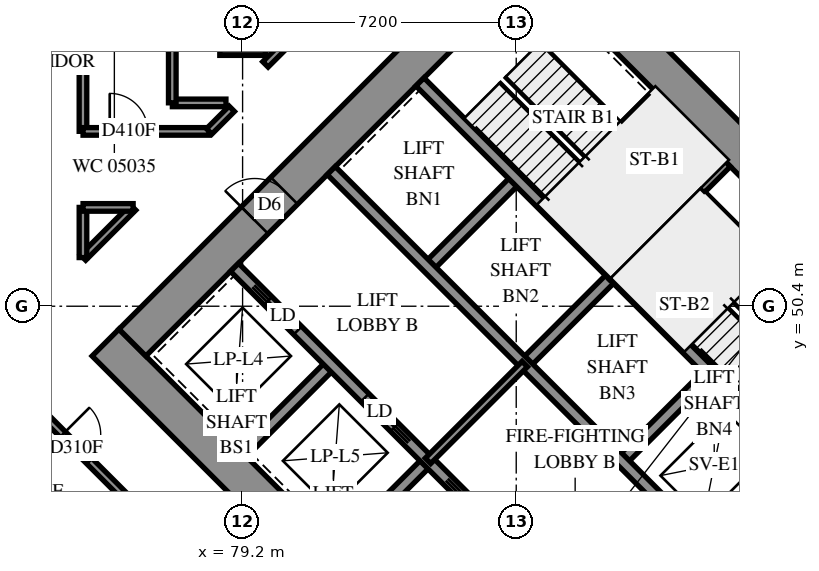
"""IFC4 building model, lengths in metres.
Left out: names, types, materials, properties, quantities, classifications, styles, units other than length and angle.
Written with IfcOpenShell. Run it as: python <this file> out.ifc"""

import sys

from ifc_helpers import new_model, si_unit, direction, frame, frame_2d, origin, origin_2d, place, context, subcontext, project, spatial, polyline, rectangle, outline, extrude, element, fill, save


model = new_model("IFC4")
c1 = context("Model", 3, precision=1e-05, world=origin(), true_north=direction((0.0, 1.0)))
c2 = subcontext(c1, "Body", "Model", "MODEL_VIEW")
j1 = project(units=[si_unit("LENGTHUNIT", "METRE"), si_unit("PLANEANGLEUNIT", "RADIAN")], contexts=[c1])
p1 = place(None, origin())
s1 = spatial("IfcSite", under=j1, at=p1, CompositionType="ELEMENT")
p2 = place(p1, origin())
s2 = spatial("IfcBuilding", under=s1, at=p2, CompositionType="ELEMENT")
p3 = place(p2, frame((0.0, 0.0, 22.8)))
s3 = spatial("IfcBuildingStorey", under=s2, at=p3, CompositionType="ELEMENT", Elevation=22.8)
p4 = place(p3, frame((79.2, 57.6, 0.0), z_axis=(0.0, 0.0, 1.0), x_axis=(1.0, 0.0, 0.0)))
e1 = element("IfcColumn", 1, at=p4, inside=s3, PredefinedType="COLUMN", context=c2, shape_type="SweptSolid", body=[
    extrude(rectangle(XDim=1.2, YDim=1.2, at=origin_2d()), origin(), (0.0, 0.0, 1.0), 3.9),
])
p5 = place(p3, frame((75.594, 49.443, -0.4), z_axis=(0.0, 0.0, 1.0), x_axis=(0.7071037324, -0.70710983, 0.0)))
e2 = element("IfcWall", 2, at=p5, inside=s3, PredefinedType="SHEAR", context=c2, shape_type="SweptSolid", body=[
    extrude(rectangle(XDim=16.4, YDim=1.0, at=frame_2d((8.2, 0.0))), origin(), (0.0, 0.0, 1.0), 3.6),
])
p6 = place(p3, frame((86.483, 60.333, -0.4), z_axis=(0.0, 0.0, 1.0), x_axis=(0.70710983, -0.7071037324, 0.0)))
e3 = element("IfcWall", 3, at=p6, inside=s3, PredefinedType="SHEAR", context=c2, shape_type="SweptSolid", body=[
    extrude(rectangle(XDim=16.4, YDim=1.0, at=frame_2d((8.2, 0.0))), origin(), (0.0, 0.0, 1.0), 3.6),
])
p7 = place(p6, frame((11.0, 0.0, 0.4)))
e4 = element("IfcOpeningElement", 4, at=p7, cuts=e3, PredefinedType="OPENING", context=c2, shape_type="SweptSolid", body=[
    extrude(rectangle(XDim=0.8, YDim=2.1, at=frame_2d((0.4, 1.05))), frame((0.0, 0.51, 0.0), z_axis=(0.0, -1.0, 0.0), x_axis=(1.0, 0.0, 0.0)), (0.0, 0.0, 1.0), 1.02),
])
p8 = place(p3, frame((76.301, 49.443, -0.4), z_axis=(0.0, 0.0, 1.0), x_axis=(0.7071067812, 0.7071067812, 0.0)))
e5 = element("IfcWall", 5, at=p8, inside=s3, PredefinedType="SHEAR", context=c2, shape_type="SweptSolid", body=[
    extrude(rectangle(XDim=14.4, YDim=1.0, at=frame_2d((7.2, 0.0))), origin(), (0.0, 0.0, 1.0), 3.6),
])
p9 = place(p8, frame((4.55, 0.0, 0.4)))
e6 = element("IfcOpeningElement", 6, at=p9, cuts=e5, PredefinedType="OPENING", context=c2, shape_type="SweptSolid", body=[
    extrude(rectangle(XDim=1.1, YDim=2.1, at=frame_2d((0.55, 1.05))), frame((0.0, 0.51, 0.0), z_axis=(0.0, -1.0, 0.0), x_axis=(1.0, 0.0, 0.0)), (0.0, 0.0, 1.0), 1.02),
])
p10 = place(p8, frame((11.35, 0.0, 0.4)))
e7 = element("IfcOpeningElement", 7, at=p10, cuts=e5, PredefinedType="OPENING", context=c2, shape_type="SweptSolid", body=[
    extrude(rectangle(XDim=1.1, YDim=2.1, at=frame_2d((0.55, 1.05))), frame((0.0, 0.51, 0.0), z_axis=(0.0, -1.0, 0.0), x_axis=(1.0, 0.0, 0.0)), (0.0, 0.0, 1.0), 1.02),
])
p11 = place(p3, frame((87.19, 38.554, -0.4), z_axis=(0.0, 0.0, 1.0), x_axis=(0.707103309, 0.7071102534, 0.0)))
e8 = element("IfcWall", 8, at=p11, inside=s3, PredefinedType="SHEAR", context=c2, shape_type="SweptSolid", body=[
    extrude(rectangle(XDim=14.4, YDim=1.0, at=frame_2d((7.2, 0.0))), origin(), (0.0, 0.0, 1.0), 3.6),
])
p12 = place(p11, frame((4.55, 0.0, 0.4)))
e9 = element("IfcOpeningElement", 9, at=p12, cuts=e8, PredefinedType="OPENING", context=c2, shape_type="SweptSolid", body=[
    extrude(rectangle(XDim=1.1, YDim=2.1, at=frame_2d((0.55, 1.05))), frame((0.0, 0.51, 0.0), z_axis=(0.0, -1.0, 0.0), x_axis=(1.0, 0.0, 0.0)), (0.0, 0.0, 1.0), 1.02),
])
p13 = place(p11, frame((11.35, 0.0, 0.4)))
e10 = element("IfcOpeningElement", 10, at=p13, cuts=e8, PredefinedType="OPENING", context=c2, shape_type="SweptSolid", body=[
    extrude(rectangle(XDim=1.1, YDim=2.1, at=frame_2d((0.55, 1.05))), frame((0.0, 0.51, 0.0), z_axis=(0.0, -1.0, 0.0), x_axis=(1.0, 0.0, 0.0)), (0.0, 0.0, 1.0), 1.02),
])
for number, where, z_axis, x_axis in (
    (11, (79.2, 46.544, 0.0), (0.0, 0.0, 1.0), (0.707, 0.707, 0.0)),
    (12, (84.079, 51.423, 0.0), (0.0, 0.0, 1.0), (0.707, 0.707, 0.0)),
):
    element("IfcWall", number, at=place(p3, frame(where, z_axis=z_axis, x_axis=x_axis)), inside=s3, PredefinedType="SOLIDWALL", context=c2, shape_type="SweptSolid", body=[
        extrude(rectangle(XDim=3.3, YDim=0.3, at=frame_2d((1.65, 0.0))), origin(), (0.0, 0.0, 1.0), 3.9),
    ])
p14 = place(p3, frame((81.746, 43.999, 0.0), z_axis=(0.0, 0.0, 1.0), x_axis=(0.7071067812, 0.7071067812, 0.0)))
e13 = element("IfcWall", 13, at=p14, inside=s3, PredefinedType="SOLIDWALL", context=c2, shape_type="SweptSolid", body=[
    extrude(rectangle(XDim=3.3, YDim=0.3, at=frame_2d((1.65, 0.0))), origin(), (0.0, 0.0, 1.0), 3.9),
])
for number, where, z_axis, x_axis in (
    (14, (86.625, 48.878, 0.0), (0.0, 0.0, 1.0), (0.707, 0.707, 0.0)),
    (15, (89.17, 46.332, 0.0), (0.0, 0.0, 1.0), (0.707, 0.707, 0.0)),
):
    element("IfcWall", number, at=place(p3, frame(where, z_axis=z_axis, x_axis=x_axis)), inside=s3, PredefinedType="SOLIDWALL", context=c2, shape_type="SweptSolid", body=[
        extrude(rectangle(XDim=3.3, YDim=0.3, at=frame_2d((1.65, 0.0))), origin(), (0.0, 0.0, 1.0), 3.9),
    ])
p15 = place(p3, frame((78.988, 51.423, 0.0), z_axis=(0.0, 0.0, 1.0), x_axis=(0.7071067812, -0.7071067812, 0.0)))
e16 = element("IfcWall", 16, at=p15, inside=s3, PredefinedType="SOLIDWALL", context=c2, shape_type="SweptSolid", body=[
    extrude(rectangle(XDim=14.4, YDim=0.3, at=frame_2d((7.2, 0.0))), origin(), (0.0, 0.0, 1.0), 3.9),
])
p16 = place(p15, frame((1.25, 0.0, 0.0)))
e17 = element("IfcOpeningElement", 17, at=p16, cuts=e16, PredefinedType="OPENING", context=c2, shape_type="SweptSolid", body=[
    extrude(rectangle(XDim=1.1, YDim=2.1, at=frame_2d((0.55, 1.05))), frame((0.0, 0.16, 0.0), z_axis=(0.0, -1.0, 0.0), x_axis=(1.0, 0.0, 0.0)), (0.0, 0.0, 1.0), 0.32),
])
p17 = place(p15, frame((4.85, 0.0, 0.0)))
e18 = element("IfcOpeningElement", 18, at=p17, cuts=e16, PredefinedType="OPENING", context=c2, shape_type="SweptSolid", body=[
    extrude(rectangle(XDim=1.1, YDim=2.1, at=frame_2d((0.55, 1.05))), frame((0.0, 0.16, 0.0), z_axis=(0.0, -1.0, 0.0), x_axis=(1.0, 0.0, 0.0)), (0.0, 0.0, 1.0), 0.32),
])
p18 = place(p15, frame((8.45, 0.0, 0.0)))
e19 = element("IfcOpeningElement", 19, at=p18, cuts=e16, PredefinedType="OPENING", context=c2, shape_type="SweptSolid", body=[
    extrude(rectangle(XDim=1.1, YDim=2.1, at=frame_2d((0.55, 1.05))), frame((0.0, 0.16, 0.0), z_axis=(0.0, -1.0, 0.0), x_axis=(1.0, 0.0, 0.0)), (0.0, 0.0, 1.0), 0.32),
])
p19 = place(p15, frame((12.05, 0.0, 0.0)))
e20 = element("IfcOpeningElement", 20, at=p19, cuts=e16, PredefinedType="OPENING", context=c2, shape_type="SweptSolid", body=[
    extrude(rectangle(XDim=1.1, YDim=2.1, at=frame_2d((0.55, 1.05))), frame((0.0, 0.16, 0.0), z_axis=(0.0, -1.0, 0.0), x_axis=(1.0, 0.0, 0.0)), (0.0, 0.0, 1.0), 0.32),
])
p20 = place(p3, frame((81.534, 53.969, 0.0), z_axis=(0.0, 0.0, 1.0), x_axis=(0.707103309, -0.7071102534, 0.0)))
e21 = element("IfcWall", 21, at=p20, inside=s3, PredefinedType="SOLIDWALL", context=c2, shape_type="SweptSolid", body=[
    extrude(rectangle(XDim=14.4, YDim=0.3, at=frame_2d((7.2, 0.0))), origin(), (0.0, 0.0, 1.0), 3.9),
])
p21 = place(p20, frame((12.05, 0.0, 0.0)))
e22 = element("IfcOpeningElement", 22, at=p21, cuts=e21, PredefinedType="OPENING", context=c2, shape_type="SweptSolid", body=[
    extrude(rectangle(XDim=1.1, YDim=2.1, at=frame_2d((0.55, 1.05))), frame((0.0, 0.16, 0.0), z_axis=(0.0, -1.0, 0.0), x_axis=(1.0, 0.0, 0.0)), (0.0, 0.0, 1.0), 0.32),
])
for number, where, z_axis, x_axis in (
    (23, (83.867, 56.302, 0.0), (0.0, 0.0, 1.0), (0.707, -0.707, 0.0)),
    (24, (88.958, 51.211, 0.0), (0.0, 0.0, 1.0), (0.707, -0.707, 0.0)),
):
    element("IfcWall", number, at=place(p3, frame(where, z_axis=z_axis, x_axis=x_axis)), inside=s3, PredefinedType="SOLIDWALL", context=c2, shape_type="SweptSolid", body=[
        extrude(rectangle(XDim=7.2, YDim=0.3, at=frame_2d((3.6, 0.0))), origin(), (0.0, 0.0, 1.0), 3.9),
    ])
p22 = place(p3, frame((88.958, 51.211, 0.0), z_axis=(0.0, 0.0, 1.0), x_axis=(0.7071067812, 0.7071067812, 0.0)))
e25 = element("IfcWall", 25, at=p22, inside=s3, PredefinedType="SOLIDWALL", context=c2, shape_type="SweptSolid", body=[
    extrude(rectangle(XDim=4.2, YDim=0.3, at=frame_2d((2.1, 0.0))), origin(), (0.0, 0.0, 1.0), 3.9),
])
p23 = place(p3, frame((117.843, 34.665, 0.0), z_axis=(0.0, 0.0, 1.0), x_axis=(-0.7071067812, 0.7071067812, 0.0)))
e26 = element("IfcWall", 26, at=p23, inside=s3, PredefinedType="SOLIDWALL", context=c2, shape_type="SweptSolid", body=[
    extrude(outline(polyline([(-0.275, -0.275), (54.222, -0.275), (53.994, 0.275), (0.275, 0.275), (-0.275, -0.275)])), origin(), (0.0, 0.0, 1.0), 3.9),
])
p24 = place(p23, frame((0.8, 0.0, 0.7)))
e27 = element("IfcOpeningElement", 27, at=p24, cuts=e26, PredefinedType="OPENING", context=c2, shape_type="SweptSolid", body=[
    extrude(rectangle(XDim=1.8, YDim=2.4, at=frame_2d((0.9, 1.2))), frame((0.0, 0.285, 0.0), z_axis=(0.0, -1.0, 0.0), x_axis=(1.0, 0.0, 0.0)), (0.0, 0.0, 1.0), 0.57),
])
p25 = place(p23, frame((4.225, 0.0, 0.7)))
e28 = element("IfcOpeningElement", 28, at=p25, cuts=e26, PredefinedType="OPENING", context=c2, shape_type="SweptSolid", body=[
    extrude(rectangle(XDim=1.8, YDim=2.4, at=frame_2d((0.9, 1.2))), frame((0.0, 0.285, 0.0), z_axis=(0.0, -1.0, 0.0), x_axis=(1.0, 0.0, 0.0)), (0.0, 0.0, 1.0), 0.57),
])
p26 = place(p23, frame((7.825, 0.0, 0.7)))
e29 = element("IfcOpeningElement", 29, at=p26, cuts=e26, PredefinedType="OPENING", context=c2, shape_type="SweptSolid", body=[
    extrude(rectangle(XDim=1.8, YDim=2.4, at=frame_2d((0.9, 1.2))), frame((0.0, 0.285, 0.0), z_axis=(0.0, -1.0, 0.0), x_axis=(1.0, 0.0, 0.0)), (0.0, 0.0, 1.0), 0.57),
])
p27 = place(p23, frame((11.425, 0.0, 0.7)))
e30 = element("IfcOpeningElement", 30, at=p27, cuts=e26, PredefinedType="OPENING", context=c2, shape_type="SweptSolid", body=[
    extrude(rectangle(XDim=1.8, YDim=2.4, at=frame_2d((0.9, 1.2))), frame((0.0, 0.285, 0.0), z_axis=(0.0, -1.0, 0.0), x_axis=(1.0, 0.0, 0.0)), (0.0, 0.0, 1.0), 0.57),
])
p28 = place(p23, frame((15.025, 0.0, 0.7)))
e31 = element("IfcOpeningElement", 31, at=p28, cuts=e26, PredefinedType="OPENING", context=c2, shape_type="SweptSolid", body=[
    extrude(rectangle(XDim=1.8, YDim=2.4, at=frame_2d((0.9, 1.2))), frame((0.0, 0.285, 0.0), z_axis=(0.0, -1.0, 0.0), x_axis=(1.0, 0.0, 0.0)), (0.0, 0.0, 1.0), 0.57),
])
p29 = place(p23, frame((18.625, 0.0, 0.7)))
e32 = element("IfcOpeningElement", 32, at=p29, cuts=e26, PredefinedType="OPENING", context=c2, shape_type="SweptSolid", body=[
    extrude(rectangle(XDim=1.8, YDim=2.4, at=frame_2d((0.9, 1.2))), frame((0.0, 0.285, 0.0), z_axis=(0.0, -1.0, 0.0), x_axis=(1.0, 0.0, 0.0)), (0.0, 0.0, 1.0), 0.57),
])
p30 = place(p23, frame((22.225, 0.0, 0.7)))
e33 = element("IfcOpeningElement", 33, at=p30, cuts=e26, PredefinedType="OPENING", context=c2, shape_type="SweptSolid", body=[
    extrude(rectangle(XDim=1.8, YDim=2.4, at=frame_2d((0.9, 1.2))), frame((0.0, 0.285, 0.0), z_axis=(0.0, -1.0, 0.0), x_axis=(1.0, 0.0, 0.0)), (0.0, 0.0, 1.0), 0.57),
])
p31 = place(p23, frame((25.825, 0.0, 0.7)))
e34 = element("IfcOpeningElement", 34, at=p31, cuts=e26, PredefinedType="OPENING", context=c2, shape_type="SweptSolid", body=[
    extrude(rectangle(XDim=1.8, YDim=2.4, at=frame_2d((0.9, 1.2))), frame((0.0, 0.285, 0.0), z_axis=(0.0, -1.0, 0.0), x_axis=(1.0, 0.0, 0.0)), (0.0, 0.0, 1.0), 0.57),
])
p32 = place(p23, frame((29.425, 0.0, 0.7)))
e35 = element("IfcOpeningElement", 35, at=p32, cuts=e26, PredefinedType="OPENING", context=c2, shape_type="SweptSolid", body=[
    extrude(rectangle(XDim=1.8, YDim=2.4, at=frame_2d((0.9, 1.2))), frame((0.0, 0.285, 0.0), z_axis=(0.0, -1.0, 0.0), x_axis=(1.0, 0.0, 0.0)), (0.0, 0.0, 1.0), 0.57),
])
p33 = place(p23, frame((33.025, 0.0, 0.7)))
e36 = element("IfcOpeningElement", 36, at=p33, cuts=e26, PredefinedType="OPENING", context=c2, shape_type="SweptSolid", body=[
    extrude(rectangle(XDim=1.8, YDim=2.4, at=frame_2d((0.9, 1.2))), frame((0.0, 0.285, 0.0), z_axis=(0.0, -1.0, 0.0), x_axis=(1.0, 0.0, 0.0)), (0.0, 0.0, 1.0), 0.57),
])
p34 = place(p23, frame((36.625, 0.0, 0.7)))
e37 = element("IfcOpeningElement", 37, at=p34, cuts=e26, PredefinedType="OPENING", context=c2, shape_type="SweptSolid", body=[
    extrude(rectangle(XDim=1.8, YDim=2.4, at=frame_2d((0.9, 1.2))), frame((0.0, 0.285, 0.0), z_axis=(0.0, -1.0, 0.0), x_axis=(1.0, 0.0, 0.0)), (0.0, 0.0, 1.0), 0.57),
])
p35 = place(p23, frame((40.225, 0.0, 0.7)))
e38 = element("IfcOpeningElement", 38, at=p35, cuts=e26, PredefinedType="OPENING", context=c2, shape_type="SweptSolid", body=[
    extrude(rectangle(XDim=1.8, YDim=2.4, at=frame_2d((0.9, 1.2))), frame((0.0, 0.285, 0.0), z_axis=(0.0, -1.0, 0.0), x_axis=(1.0, 0.0, 0.0)), (0.0, 0.0, 1.0), 0.57),
])
p36 = place(p23, frame((43.825, 0.0, 0.7)))
e39 = element("IfcOpeningElement", 39, at=p36, cuts=e26, PredefinedType="OPENING", context=c2, shape_type="SweptSolid", body=[
    extrude(rectangle(XDim=1.8, YDim=2.4, at=frame_2d((0.9, 1.2))), frame((0.0, 0.285, 0.0), z_axis=(0.0, -1.0, 0.0), x_axis=(1.0, 0.0, 0.0)), (0.0, 0.0, 1.0), 0.57),
])
p37 = place(p23, frame((47.425, 0.0, 0.7)))
e40 = element("IfcOpeningElement", 40, at=p37, cuts=e26, PredefinedType="OPENING", context=c2, shape_type="SweptSolid", body=[
    extrude(rectangle(XDim=1.8, YDim=2.4, at=frame_2d((0.9, 1.2))), frame((0.0, 0.285, 0.0), z_axis=(0.0, -1.0, 0.0), x_axis=(1.0, 0.0, 0.0)), (0.0, 0.0, 1.0), 0.57),
])
p38 = place(p23, frame((51.06, 0.0, 0.7)))
e41 = element("IfcOpeningElement", 41, at=p38, cuts=e26, PredefinedType="OPENING", context=c2, shape_type="SweptSolid", body=[
    extrude(rectangle(XDim=1.8, YDim=2.4, at=frame_2d((0.9, 1.2))), frame((0.0, 0.285, 0.0), z_axis=(0.0, -1.0, 0.0), x_axis=(1.0, 0.0, 0.0)), (0.0, 0.0, 1.0), 0.57),
])
p39 = place(p3, frame((91.313, 53.354, 0.0), z_axis=(0.0, 0.0, 1.0), x_axis=(0.7071067812, -0.7071067812, 0.0)))
e42 = element("IfcWall", 42, at=p39, inside=s3, PredefinedType="PARTITIONING", context=c2, shape_type="SweptSolid", body=[
    extrude(rectangle(XDim=5.95, YDim=0.15, at=frame_2d((2.975, 0.0))), origin(), (0.0, 0.0, 1.0), 3.9),
])
p40 = place(p3, frame((84.079, 46.332, 0.0), z_axis=(0.0, 0.0, 1.0), x_axis=(0.7071067812, 0.7071067812, 0.0)))
e43 = element("IfcWall", 43, at=p40, inside=s3, PredefinedType="PARTITIONING", context=c2, shape_type="SweptSolid", body=[
    extrude(rectangle(XDim=3.6, YDim=0.2, at=frame_2d((1.8, 0.0))), origin(), (0.0, 0.0, 1.0), 3.9),
])
p41 = place(p3, frame((89.13, 61.215, 0.0), z_axis=(0.0, 0.0, 1.0), x_axis=(0.7071067812, -0.7071067812, 0.0)))
e44 = element("IfcWall", 44, at=p41, inside=s3, PredefinedType="PARTITIONING", context=c2, shape_type="SweptSolid", body=[
    extrude(rectangle(XDim=6.703, YDim=0.2, at=frame_2d((3.352, 0.0))), origin(), (0.0, 0.0, 1.0), 3.9),
])
p42 = place(p41, frame((2.11, 0.0, 0.0)))
e45 = element("IfcOpeningElement", 45, at=p42, cuts=e44, PredefinedType="OPENING", context=c2, shape_type="SweptSolid", body=[
    extrude(rectangle(XDim=1.0, YDim=2.1, at=frame_2d((0.5, 1.05))), frame((0.0, 0.11, 0.0), z_axis=(0.0, -1.0, 0.0), x_axis=(1.0, 0.0, 0.0)), (0.0, 0.0, 1.0), 0.22),
])
p43 = place(p3, frame((74.099, 47.397, 0.0), z_axis=(0.0, 0.0, 1.0), x_axis=(0.7071067812, -0.7071067812, 0.0)))
e46 = element("IfcWall", 46, at=p43, inside=s3, PredefinedType="PARTITIONING", context=c2, shape_type="SweptSolid", body=[
    extrude(rectangle(XDim=4.593, YDim=0.2, at=frame_2d((2.297, 0.0))), origin(), (0.0, 0.0, 1.0), 3.9),
])
p44 = place(p43, frame((0.521, 0.0, 0.0)))
e47 = element("IfcOpeningElement", 47, at=p44, cuts=e46, PredefinedType="OPENING", context=c2, shape_type="SweptSolid", body=[
    extrude(rectangle(XDim=1.0, YDim=2.1, at=frame_2d((0.5, 1.05))), frame((0.0, 0.11, 0.0), z_axis=(0.0, -1.0, 0.0), x_axis=(1.0, 0.0, 0.0)), (0.0, 0.0, 1.0), 0.22),
])
p45 = place(p3, frame((75.0, 55.002, 0.0), z_axis=(0.0, 0.0, 1.0), x_axis=(0.0, 1.0, 0.0)))
e48 = element("IfcWall", 48, at=p45, inside=s3, PredefinedType="PARTITIONING", context=c2, shape_type="SweptSolid", body=[
    extrude(rectangle(XDim=4.508, YDim=0.2, at=frame_2d((2.254, 0.0))), origin(), (0.0, 0.0, 1.0), 3.9),
])
p46 = place(p3, frame((74.999, 59.507, 0.0), z_axis=(0.0, 0.0, 1.0), x_axis=(0.7071067812, -0.7071067812, 0.0)))
e49 = element("IfcWall", 49, at=p46, inside=s3, PredefinedType="PARTITIONING", context=c2, shape_type="SweptSolid", body=[
    extrude(rectangle(XDim=3.321, YDim=0.2, at=frame_2d((1.66, 0.0))), origin(), (0.0, 0.0, 1.0), 3.9),
])
p47 = place(p3, frame((75.002, 55.0, 0.0), z_axis=(0.0, 0.0, 1.0), x_axis=(1.0, 0.0, 0.0)))
e50 = element("IfcWall", 50, at=p47, inside=s3, PredefinedType="PARTITIONING", context=c2, shape_type="SweptSolid", body=[
    extrude(rectangle(XDim=3.32, YDim=0.2, at=frame_2d((1.66, 0.0))), origin(), (0.0, 0.0, 1.0), 3.9),
])
p48 = place(p47, frame((0.702, 0.0, 0.0)))
e51 = element("IfcOpeningElement", 51, at=p48, cuts=e50, PredefinedType="OPENING", context=c2, shape_type="SweptSolid", body=[
    extrude(rectangle(XDim=1.0, YDim=2.1, at=frame_2d((0.5, 1.05))), frame((0.0, 0.11, 0.0), z_axis=(0.0, -1.0, 0.0), x_axis=(1.0, 0.0, 0.0)), (0.0, 0.0, 1.0), 0.22),
])
p49 = place(p3, frame((75.001, 51.681, 0.0), z_axis=(0.0, 0.0, 1.0), x_axis=(0.7071067812, 0.7071067812, 0.0)))
e52 = element("IfcWall", 52, at=p49, inside=s3, PredefinedType="PARTITIONING", context=c2, shape_type="SweptSolid", body=[
    extrude(rectangle(XDim=1.864, YDim=0.2, at=frame_2d((0.932, 0.0))), origin(), (0.0, 0.0, 1.0), 3.9),
])
p50 = place(p3, frame((79.801, 56.763, 0.0), z_axis=(0.0, 0.0, 1.0), x_axis=(0.7071067812, 0.7071067812, 0.0)))
e53 = element("IfcWall", 53, at=p50, inside=s3, PredefinedType="PARTITIONING", context=c2, shape_type="SweptSolid", body=[
    extrude(rectangle(XDim=1.765, YDim=0.2, at=frame_2d((0.882, 0.0))), origin(), (0.0, 0.0, 1.0), 3.9),
])
for number, where, z_axis, x_axis in (
    (54, (77.352, 55.75, 0.0), (0.0, 0.0, 1.0), (1.0, 0.0, 0.0)),
    (55, (77.35, 55.752, 0.0), (0.0, 0.0, 1.0), (0.0, 1.0, 0.0)),
):
    element("IfcWall", number, at=place(p3, frame(where, z_axis=z_axis, x_axis=x_axis)), inside=s3, PredefinedType="PARTITIONING", context=c2, shape_type="SweptSolid", body=[
        extrude(rectangle(XDim=1.41, YDim=0.2, at=frame_2d((0.705, 0.0))), origin(), (0.0, 0.0, 1.0), 3.9),
    ])
p51 = place(p3, frame((75.0, 51.68, 0.0), z_axis=(0.0, 0.0, 1.0), x_axis=(0.0, 1.0, 0.0)))
e56 = element("IfcWall", 56, at=p51, inside=s3, PredefinedType="PARTITIONING", context=c2, shape_type="SweptSolid", body=[
    extrude(rectangle(XDim=1.32, YDim=0.2, at=frame_2d((0.66, 0.0))), origin(), (0.0, 0.0, 1.0), 3.9),
])
p52 = place(p3, frame((75.002, 53.0, 0.0), z_axis=(0.0, 0.0, 1.0), x_axis=(1.0, 0.0, 0.0)))
e57 = element("IfcWall", 57, at=p52, inside=s3, PredefinedType="PARTITIONING", context=c2, shape_type="SweptSolid", body=[
    extrude(rectangle(XDim=1.318, YDim=0.2, at=frame_2d((0.659, 0.0))), origin(), (0.0, 0.0, 1.0), 3.9),
])
p53 = place(p3, frame((78.321, 55.001, 0.0), z_axis=(0.0, 0.0, 1.0), x_axis=(0.7071067812, 0.7071067812, 0.0)))
e58 = element("IfcWall", 58, at=p53, inside=s3, PredefinedType="PARTITIONING", context=c2, shape_type="SweptSolid", body=[
    extrude(rectangle(XDim=0.84, YDim=0.2, at=frame_2d((0.42, 0.0))), origin(), (0.0, 0.0, 1.0), 3.9),
])
p54 = place(p9, origin())
e59 = element("IfcDoor", 59, at=p54, inside=s3, OperationType="DOUBLE_DOOR_SINGLE_SWING", PredefinedType="DOOR", context=c2, shape_type="SweptSolid", body=[
    extrude(rectangle(XDim=1.1, YDim=2.1, at=frame_2d((0.55, 1.05))), frame((0.0, 0.025, 0.0), z_axis=(0.0, -1.0, 0.0), x_axis=(1.0, 0.0, 0.0)), (0.0, 0.0, 1.0), 0.05),
])
fill(e6, e59)
p55 = place(p16, origin())
e60 = element("IfcDoor", 60, at=p55, inside=s3, OperationType="SLIDING_TO_LEFT", PredefinedType="DOOR", context=c2, shape_type="SweptSolid", body=[
    extrude(rectangle(XDim=1.1, YDim=2.1, at=frame_2d((0.55, 1.05))), frame((0.0, 0.025, 0.0), z_axis=(0.0, -1.0, 0.0), x_axis=(1.0, 0.0, 0.0)), (0.0, 0.0, 1.0), 0.05),
])
fill(e17, e60)
p56 = place(p17, origin())
e61 = element("IfcDoor", 61, at=p56, inside=s3, OperationType="SLIDING_TO_RIGHT", PredefinedType="DOOR", context=c2, shape_type="SweptSolid", body=[
    extrude(rectangle(XDim=1.1, YDim=2.1, at=frame_2d((0.55, 1.05))), frame((0.0, 0.025, 0.0), z_axis=(0.0, -1.0, 0.0), x_axis=(1.0, 0.0, 0.0)), (0.0, 0.0, 1.0), 0.05),
])
fill(e18, e61)
p57 = place(p44, origin())
e62 = element("IfcDoor", 62, at=p57, inside=s3, OperationType="SINGLE_SWING_LEFT", PredefinedType="DOOR", context=c2, shape_type="SweptSolid", body=[
    extrude(rectangle(XDim=1.0, YDim=2.1, at=frame_2d((0.5, 1.05))), frame((0.0, 0.025, 0.0), z_axis=(0.0, -1.0, 0.0), x_axis=(1.0, 0.0, 0.0)), (0.0, 0.0, 1.0), 0.05),
])
fill(e47, e62)
p58 = place(p48, origin())
e63 = element("IfcDoor", 63, at=p58, inside=s3, OperationType="SINGLE_SWING_LEFT", PredefinedType="DOOR", context=c2, shape_type="SweptSolid", body=[
    extrude(rectangle(XDim=1.0, YDim=2.1, at=frame_2d((0.5, 1.05))), frame((0.0, 0.025, 0.0), z_axis=(0.0, -1.0, 0.0), x_axis=(1.0, 0.0, 0.0)), (0.0, 0.0, 1.0), 0.05),
])
fill(e51, e63)
save(model, sys.argv[1])
